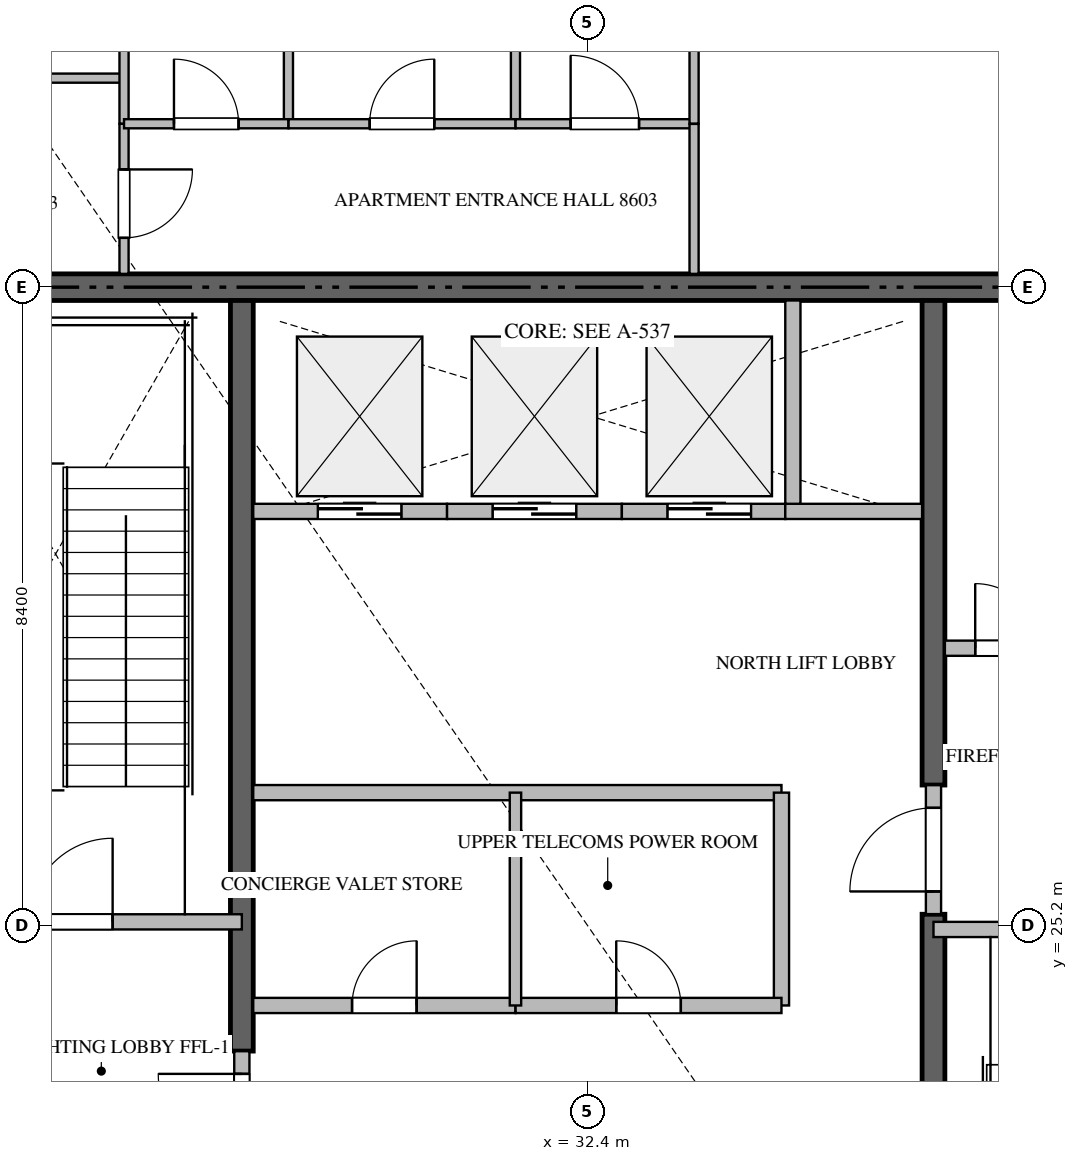
"""IFC4 building model, lengths in metres.
Left out: names, types, materials, properties, quantities, classifications, styles, units other than length and angle.
Written with IfcOpenShell. Run it as: python <this file> out.ifc"""

import sys

from ifc_helpers import new_model, si_unit, direction, frame, frame_2d, origin, place, context, subcontext, project, spatial, rectangle, extrude, source, transform, mapped, element, fill, save


model = new_model("IFC4")
c1 = context("Model", 3, precision=1e-05, world=origin(), true_north=direction((0.0, 1.0)))
c2 = subcontext(c1, "Body", "Model", "MODEL_VIEW")
j1 = project(units=[si_unit("LENGTHUNIT", "METRE"), si_unit("PLANEANGLEUNIT", "RADIAN")], contexts=[c1])
p1 = place(None, origin())
s1 = spatial("IfcSite", under=j1, at=p1, CompositionType="ELEMENT")
p2 = place(p1, origin())
s2 = spatial("IfcBuilding", under=s1, at=p2, CompositionType="ELEMENT")
p3 = place(p2, frame((0.0, 0.0, 347.95)))
s3 = spatial("IfcBuildingStorey", under=s2, at=p3, CompositionType="ELEMENT", Elevation=347.95)
p4 = place(p3, frame((41.4, 33.6, -0.26), z_axis=(0.0, 0.0, 1.0), x_axis=(-1.0, 0.0, 0.0)))
e1 = element("IfcWall", 1, at=p4, inside=s3, PredefinedType="SHEAR", context=c2, shape_type="SweptSolid", body=[
    extrude(rectangle(XDim=18.0, YDim=0.35, at=frame_2d((9.0, 0.0))), origin(), (0.0, 0.0, 1.0), 5.898),
])
p5 = place(p3, frame((27.85, 23.55, -0.26), z_axis=(0.0, 0.0, 1.0), x_axis=(0.0, 1.0, 0.0)))
e2 = element("IfcWall", 2, at=p5, inside=s3, PredefinedType="SHEAR", context=c2, shape_type="SweptSolid", body=[
    extrude(rectangle(XDim=9.875, YDim=0.3, at=frame_2d((4.938, 0.0))), origin(), (0.0, 0.0, 1.0), 5.898),
])
p6 = place(p3, frame((36.95, 16.975, -0.26), z_axis=(0.0, 0.0, 1.0), x_axis=(0.0, 1.0, 0.0)))
e3 = element("IfcWall", 3, at=p6, inside=s3, PredefinedType="SHEAR", context=c2, shape_type="SweptSolid", body=[
    extrude(rectangle(XDim=8.375, YDim=0.3, at=frame_2d((4.188, 0.0))), origin(), (0.0, 0.0, 1.0), 5.898),
])
p7 = place(p3, frame((36.95, 27.05, -0.26), z_axis=(0.0, 0.0, 1.0), x_axis=(0.0, 1.0, 0.0)))
e4 = element("IfcWall", 4, at=p7, inside=s3, PredefinedType="SHEAR", context=c2, shape_type="SweptSolid", body=[
    extrude(rectangle(XDim=6.375, YDim=0.3, at=frame_2d((3.188, 0.0))), origin(), (0.0, 0.0, 1.0), 5.898),
])
p8 = place(p3, frame((23.4, 25.25, 0.0), z_axis=(0.0, 0.0, 1.0), x_axis=(1.0, 0.0, 0.0)))
e5 = element("IfcWall", 5, at=p8, inside=s3, PredefinedType="STANDARD", context=c2, shape_type="SweptSolid", body=[
    extrude(rectangle(XDim=4.45, YDim=0.2, at=frame_2d((2.225, 0.0))), origin(), (0.0, 0.0, 1.0), 5.64),
])
p9 = place(p8, frame((1.65, 0.0, 0.0)))
e6 = element("IfcOpeningElement", 6, at=p9, cuts=e5, PredefinedType="OPENING", context=c2, shape_type="SweptSolid", body=[
    extrude(rectangle(XDim=1.1, YDim=2.15, at=frame_2d((0.55, 1.075))), frame((0.0, 0.11, 0.0), z_axis=(0.0, -1.0, 0.0), x_axis=(1.0, 0.0, 0.0)), (0.0, 0.0, 1.0), 0.22),
])
p10 = place(p3, frame((36.95, 25.15, 0.0), z_axis=(0.0, 0.0, 1.0), x_axis=(1.0, 0.0, 0.0)))
e7 = element("IfcWall", 7, at=p10, inside=s3, PredefinedType="STANDARD", context=c2, shape_type="SweptSolid", body=[
    extrude(rectangle(XDim=4.45, YDim=0.2, at=frame_2d((2.225, 0.0))), origin(), (0.0, 0.0, 1.0), 5.64),
])
p11 = place(p10, frame((1.65, 0.0, 0.0)))
e8 = element("IfcOpeningElement", 8, at=p11, cuts=e7, PredefinedType="OPENING", context=c2, shape_type="SweptSolid", body=[
    extrude(rectangle(XDim=1.1, YDim=2.15, at=frame_2d((0.55, 1.075))), frame((0.0, 0.11, 0.0), z_axis=(0.0, -1.0, 0.0), x_axis=(1.0, 0.0, 0.0)), (0.0, 0.0, 1.0), 0.22),
])
p12 = place(p3, frame((28.0, 30.65, 0.0), z_axis=(0.0, 0.0, 1.0), x_axis=(1.0, 0.0, 0.0)))
e9 = element("IfcWall", 9, at=p12, inside=s3, PredefinedType="STANDARD", context=c2, shape_type="SweptSolid", body=[
    extrude(rectangle(XDim=2.55, YDim=0.2, at=frame_2d((1.275, 0.0))), origin(), (0.0, 0.0, 1.0), 5.64),
])
p13 = place(p12, frame((0.85, 0.0, 0.0)))
e10 = element("IfcOpeningElement", 10, at=p13, cuts=e9, PredefinedType="OPENING", context=c2, shape_type="SweptSolid", body=[
    extrude(rectangle(XDim=1.1, YDim=2.2, at=frame_2d((0.55, 1.1))), frame((0.0, 0.11, 0.0), z_axis=(0.0, -1.0, 0.0), x_axis=(1.0, 0.0, 0.0)), (0.0, 0.0, 1.0), 0.22),
])
p14 = place(p3, frame((30.55, 30.65, 0.0), z_axis=(0.0, 0.0, 1.0), x_axis=(1.0, 0.0, 0.0)))
e11 = element("IfcWall", 11, at=p14, inside=s3, PredefinedType="STANDARD", context=c2, shape_type="SweptSolid", body=[
    extrude(rectangle(XDim=2.3, YDim=0.2, at=frame_2d((1.15, 0.0))), origin(), (0.0, 0.0, 1.0), 5.64),
])
p15 = place(p14, frame((0.6, 0.0, 0.0)))
e12 = element("IfcOpeningElement", 12, at=p15, cuts=e11, PredefinedType="OPENING", context=c2, shape_type="SweptSolid", body=[
    extrude(rectangle(XDim=1.1, YDim=2.2, at=frame_2d((0.55, 1.1))), frame((0.0, 0.11, 0.0), z_axis=(0.0, -1.0, 0.0), x_axis=(1.0, 0.0, 0.0)), (0.0, 0.0, 1.0), 0.22),
])
p16 = place(p3, frame((32.85, 30.65, 0.0), z_axis=(0.0, 0.0, 1.0), x_axis=(1.0, 0.0, 0.0)))
e13 = element("IfcWall", 13, at=p16, inside=s3, PredefinedType="STANDARD", context=c2, shape_type="SweptSolid", body=[
    extrude(rectangle(XDim=2.15, YDim=0.2, at=frame_2d((1.075, 0.0))), origin(), (0.0, 0.0, 1.0), 5.64),
])
p17 = place(p16, frame((0.6, 0.0, 0.0)))
e14 = element("IfcOpeningElement", 14, at=p17, cuts=e13, PredefinedType="OPENING", context=c2, shape_type="SweptSolid", body=[
    extrude(rectangle(XDim=1.1, YDim=2.2, at=frame_2d((0.55, 1.1))), frame((0.0, 0.11, 0.0), z_axis=(0.0, -1.0, 0.0), x_axis=(1.0, 0.0, 0.0)), (0.0, 0.0, 1.0), 0.22),
])
p18 = place(p3, frame((35.0, 30.65, 0.0), z_axis=(0.0, 0.0, 1.0), x_axis=(1.0, 0.0, 0.0)))
e15 = element("IfcWall", 15, at=p18, inside=s3, PredefinedType="STANDARD", context=c2, shape_type="SweptSolid", body=[
    extrude(rectangle(XDim=1.8, YDim=0.2, at=frame_2d((0.9, 0.0))), origin(), (0.0, 0.0, 1.0), 5.64),
])
p19 = place(p3, frame((35.1, 30.75, 0.0), z_axis=(0.0, 0.0, 1.0), x_axis=(0.0, 1.0, 0.0)))
e16 = element("IfcWall", 16, at=p19, inside=s3, PredefinedType="STANDARD", context=c2, shape_type="SweptSolid", body=[
    extrude(rectangle(XDim=2.675, YDim=0.2, at=frame_2d((1.337, 0.0))), origin(), (0.0, 0.0, 1.0), 5.64),
])
p20 = place(p3, frame((37.1, 28.85, 0.0), z_axis=(0.0, 0.0, 1.0), x_axis=(1.0, 0.0, 0.0)))
e17 = element("IfcWall", 17, at=p20, inside=s3, PredefinedType="STANDARD", context=c2, shape_type="SweptSolid", body=[
    extrude(rectangle(XDim=1.648, YDim=0.2, at=frame_2d((0.824, 0.0))), origin(), (0.0, 0.0, 1.0), 5.64),
])
p21 = place(p20, frame((0.399, 0.0, 0.0)))
e18 = element("IfcOpeningElement", 18, at=p21, cuts=e17, PredefinedType="OPENING", context=c2, shape_type="SweptSolid", body=[
    extrude(rectangle(XDim=0.85, YDim=2.1, at=frame_2d((0.425, 1.05))), frame((0.0, 0.11, 0.0), z_axis=(0.0, -1.0, 0.0), x_axis=(1.0, 0.0, 0.0)), (0.0, 0.0, 1.0), 0.22),
])
p22 = place(p3, frame((27.85, 21.852, 0.0), z_axis=(0.0, 0.0, 1.0), x_axis=(0.0, 1.0, 0.0)))
e19 = element("IfcWall", 19, at=p22, inside=s3, PredefinedType="STANDARD", context=c2, shape_type="SweptSolid", body=[
    extrude(rectangle(XDim=1.696, YDim=0.2, at=frame_2d((0.848, 0.0))), origin(), (0.0, 0.0, 1.0), 5.64),
])
p23 = place(p22, frame((0.298, 0.0, 0.0)))
e20 = element("IfcOpeningElement", 20, at=p23, cuts=e19, PredefinedType="OPENING", context=c2, shape_type="SweptSolid", body=[
    extrude(rectangle(XDim=1.1, YDim=2.15, at=frame_2d((0.55, 1.075))), frame((0.0, 0.11, 0.0), z_axis=(0.0, -1.0, 0.0), x_axis=(1.0, 0.0, 0.0)), (0.0, 0.0, 1.0), 0.22),
])
p24 = place(p3, frame((36.95, 25.352, 0.0), z_axis=(0.0, 0.0, 1.0), x_axis=(0.0, 1.0, 0.0)))
e21 = element("IfcWall", 21, at=p24, inside=s3, PredefinedType="STANDARD", context=c2, shape_type="SweptSolid", body=[
    extrude(rectangle(XDim=1.696, YDim=0.2, at=frame_2d((0.848, 0.0))), origin(), (0.0, 0.0, 1.0), 5.64),
])
p25 = place(p24, frame((0.298, 0.0, 0.0)))
e22 = element("IfcOpeningElement", 22, at=p25, cuts=e21, PredefinedType="OPENING", context=c2, shape_type="SweptSolid", body=[
    extrude(rectangle(XDim=1.1, YDim=2.15, at=frame_2d((0.55, 1.075))), frame((0.0, 0.11, 0.0), z_axis=(0.0, -1.0, 0.0), x_axis=(1.0, 0.0, 0.0)), (0.0, 0.0, 1.0), 0.22),
])
p26 = place(p3, frame((28.0, 26.95, 0.0), z_axis=(0.0, 0.0, 1.0), x_axis=(1.0, 0.0, 0.0)))
e23 = element("IfcWall", 23, at=p26, inside=s3, PredefinedType="STANDARD", context=c2, shape_type="SweptSolid", body=[
    extrude(rectangle(XDim=6.95, YDim=0.2, at=frame_2d((3.475, 0.0))), origin(), (0.0, 0.0, 1.0), 5.64),
])
p27 = place(p3, frame((34.95, 24.15, 0.0), z_axis=(0.0, 0.0, 1.0), x_axis=(0.0, 1.0, 0.0)))
e24 = element("IfcWall", 24, at=p27, inside=s3, PredefinedType="STANDARD", context=c2, shape_type="SweptSolid", body=[
    extrude(rectangle(XDim=2.8, YDim=0.2, at=frame_2d((1.4, 0.0))), origin(), (0.0, 0.0, 1.0), 5.64),
])
p28 = place(p3, frame((28.0, 24.15, 0.0), z_axis=(0.0, 0.0, 1.0), x_axis=(1.0, 0.0, 0.0)))
e25 = element("IfcWall", 25, at=p28, inside=s3, PredefinedType="STANDARD", context=c2, shape_type="SweptSolid", body=[
    extrude(rectangle(XDim=3.45, YDim=0.2, at=frame_2d((1.725, 0.0))), origin(), (0.0, 0.0, 1.0), 5.64),
])
p29 = place(p28, frame((1.3, 0.0, 0.0)))
e26 = element("IfcOpeningElement", 26, at=p29, cuts=e25, PredefinedType="OPENING", context=c2, shape_type="SweptSolid", body=[
    extrude(rectangle(XDim=0.85, YDim=2.1, at=frame_2d((0.425, 1.05))), frame((0.0, 0.11, 0.0), z_axis=(0.0, -1.0, 0.0), x_axis=(1.0, 0.0, 0.0)), (0.0, 0.0, 1.0), 0.22),
])
p30 = place(p3, frame((31.452, 24.15, 0.0), z_axis=(0.0, 0.0, 1.0), x_axis=(1.0, 0.0, 0.0)))
e27 = element("IfcWall", 27, at=p30, inside=s3, PredefinedType="STANDARD", context=c2, shape_type="SweptSolid", body=[
    extrude(rectangle(XDim=3.498, YDim=0.2, at=frame_2d((1.749, 0.0))), origin(), (0.0, 0.0, 1.0), 5.64),
])
p31 = place(p30, frame((1.324, 0.0, 0.0)))
e28 = element("IfcOpeningElement", 28, at=p31, cuts=e27, PredefinedType="OPENING", context=c2, shape_type="SweptSolid", body=[
    extrude(rectangle(XDim=0.85, YDim=2.1, at=frame_2d((0.425, 1.05))), frame((0.0, 0.11, 0.0), z_axis=(0.0, -1.0, 0.0), x_axis=(1.0, 0.0, 0.0)), (0.0, 0.0, 1.0), 0.22),
])
p32 = place(p3, frame((31.45, 24.15, 0.0), z_axis=(0.0, 0.0, 1.0), x_axis=(0.0, 1.0, 0.0)))
e29 = element("IfcWall", 29, at=p32, inside=s3, PredefinedType="PARTITIONING", context=c2, shape_type="SweptSolid", body=[
    extrude(rectangle(XDim=2.8, YDim=0.15, at=frame_2d((1.4, 0.0))), origin(), (0.0, 0.0, 1.0), 5.64),
])
p33 = place(p3, frame((23.45, 36.35, 0.0), z_axis=(0.0, 0.0, 1.0), x_axis=(1.0, 0.0, 0.0)))
e30 = element("IfcWall", 30, at=p33, inside=s3, PredefinedType="PARTITIONING", context=c2, shape_type="SweptSolid", body=[
    extrude(rectangle(XDim=2.85, YDim=0.12, at=frame_2d((1.425, 0.0))), origin(), (0.0, 0.0, 1.0), 5.64),
])
p34 = place(p33, frame((1.0, 0.0, 0.0)))
e31 = element("IfcOpeningElement", 31, at=p34, cuts=e30, PredefinedType="OPENING", context=c2, shape_type="SweptSolid", body=[
    extrude(rectangle(XDim=0.85, YDim=2.1, at=frame_2d((0.425, 1.05))), frame((0.0, 0.07, 0.0), z_axis=(0.0, -1.0, 0.0), x_axis=(1.0, 0.0, 0.0)), (0.0, 0.0, 1.0), 0.14),
])
p35 = place(p3, frame((26.3, 35.75, 0.0), z_axis=(0.0, 0.0, 1.0), x_axis=(0.0, -1.0, 0.0)))
e32 = element("IfcWall", 32, at=p35, inside=s3, PredefinedType="PARTITIONING", context=c2, shape_type="SweptSolid", body=[
    extrude(rectangle(XDim=1.975, YDim=0.12, at=frame_2d((0.988, 0.0))), origin(), (0.0, 0.0, 1.0), 5.64),
])
p36 = place(p35, frame((0.601, 0.0, 0.0)))
e33 = element("IfcOpeningElement", 33, at=p36, cuts=e32, PredefinedType="OPENING", context=c2, shape_type="SweptSolid", body=[
    extrude(rectangle(XDim=0.9, YDim=2.1, at=frame_2d((0.45, 1.05))), frame((0.0, 0.07, 0.0), z_axis=(0.0, -1.0, 0.0), x_axis=(1.0, 0.0, 0.0)), (0.0, 0.0, 1.0), 0.14),
])
p37 = place(p3, frame((26.3, 40.027, 0.0), z_axis=(0.0, 0.0, 1.0), x_axis=(0.0, -1.0, 0.0)))
e34 = element("IfcWall", 34, at=p37, inside=s3, PredefinedType="PARTITIONING", context=c2, shape_type="SweptSolid", body=[
    extrude(rectangle(XDim=4.275, YDim=0.12, at=frame_2d((2.138, 0.0))), origin(), (0.0, 0.0, 1.0), 5.64),
])
p38 = place(p3, frame((31.45, 46.305, 0.0), z_axis=(0.0, 0.0, 1.0), x_axis=(0.0, -1.0, 0.0)))
e35 = element("IfcWall", 35, at=p38, inside=s3, PredefinedType="PARTITIONING", context=c2, shape_type="SweptSolid", body=[
    extrude(rectangle(XDim=10.555, YDim=0.12, at=frame_2d((5.277, 0.0))), origin(), (0.0, 0.0, 1.0), 5.64),
])
p39 = place(p3, frame((28.463, 40.029, 0.0), z_axis=(0.0, 0.0, 1.0), x_axis=(0.0, -1.0, 0.0)))
e36 = element("IfcWall", 36, at=p39, inside=s3, PredefinedType="PARTITIONING", context=c2, shape_type="SweptSolid", body=[
    extrude(rectangle(XDim=4.279, YDim=0.12, at=frame_2d((2.14, 0.0))), origin(), (0.0, 0.0, 1.0), 5.64),
])
p40 = place(p3, frame((26.3, 35.75, 0.0), z_axis=(0.0, 0.0, 1.0), x_axis=(1.0, 0.0, 0.0)))
e37 = element("IfcWall", 37, at=p40, inside=s3, PredefinedType="PARTITIONING", context=c2, shape_type="SweptSolid", body=[
    extrude(rectangle(XDim=2.163, YDim=0.12, at=frame_2d((1.082, 0.0))), origin(), (0.0, 0.0, 1.0), 5.64),
])
p41 = place(p40, frame((0.657, 0.0, 0.0)))
e38 = element("IfcOpeningElement", 38, at=p41, cuts=e37, PredefinedType="OPENING", context=c2, shape_type="SweptSolid", body=[
    extrude(rectangle(XDim=0.85, YDim=2.1, at=frame_2d((0.425, 1.05))), frame((0.0, 0.07, 0.0), z_axis=(0.0, -1.0, 0.0), x_axis=(1.0, 0.0, 0.0)), (0.0, 0.0, 1.0), 0.14),
])
p42 = place(p3, frame((28.465, 35.75, 0.0), z_axis=(0.0, 0.0, 1.0), x_axis=(1.0, 0.0, 0.0)))
e39 = element("IfcWall", 39, at=p42, inside=s3, PredefinedType="PARTITIONING", context=c2, shape_type="SweptSolid", body=[
    extrude(rectangle(XDim=2.985, YDim=0.12, at=frame_2d((1.492, 0.0))), origin(), (0.0, 0.0, 1.0), 5.64),
])
p43 = place(p42, frame((1.067, 0.0, 0.0)))
e40 = element("IfcOpeningElement", 40, at=p43, cuts=e39, PredefinedType="OPENING", context=c2, shape_type="SweptSolid", body=[
    extrude(rectangle(XDim=0.85, YDim=2.1, at=frame_2d((0.425, 1.05))), frame((0.0, 0.07, 0.0), z_axis=(0.0, -1.0, 0.0), x_axis=(1.0, 0.0, 0.0)), (0.0, 0.0, 1.0), 0.14),
])
p44 = place(p3, frame((31.452, 35.75, 0.0), z_axis=(0.0, 0.0, 1.0), x_axis=(1.0, 0.0, 0.0)))
e41 = element("IfcWall", 41, at=p44, inside=s3, PredefinedType="PARTITIONING", context=c2, shape_type="SweptSolid", body=[
    extrude(rectangle(XDim=2.348, YDim=0.12, at=frame_2d((1.174, 0.0))), origin(), (0.0, 0.0, 1.0), 5.64),
])
p45 = place(p44, frame((0.724, 0.0, 0.0)))
e42 = element("IfcOpeningElement", 42, at=p45, cuts=e41, PredefinedType="OPENING", context=c2, shape_type="SweptSolid", body=[
    extrude(rectangle(XDim=0.9, YDim=2.1, at=frame_2d((0.45, 1.05))), frame((0.0, 0.07, 0.0), z_axis=(0.0, -1.0, 0.0), x_axis=(1.0, 0.0, 0.0)), (0.0, 0.0, 1.0), 0.14),
])
p46 = place(p3, frame((33.8, 39.009, 0.0), z_axis=(0.0, 0.0, 1.0), x_axis=(0.0, -1.0, 0.0)))
e43 = element("IfcWall", 43, at=p46, inside=s3, PredefinedType="PARTITIONING", context=c2, shape_type="SweptSolid", body=[
    extrude(rectangle(XDim=3.259, YDim=0.12, at=frame_2d((1.629, 0.0))), origin(), (0.0, 0.0, 1.0), 5.64),
])
p47 = place(p46, frame((1.205, 0.0, 0.0)))
e44 = element("IfcOpeningElement", 44, at=p47, cuts=e43, PredefinedType="OPENING", context=c2, shape_type="SweptSolid", body=[
    extrude(rectangle(XDim=0.85, YDim=2.1, at=frame_2d((0.425, 1.05))), frame((0.0, 0.07, 0.0), z_axis=(0.0, -1.0, 0.0), x_axis=(1.0, 0.0, 0.0)), (0.0, 0.0, 1.0), 0.14),
])
p48 = place(p3, frame((33.8, 35.748, 0.0), z_axis=(0.0, 0.0, 1.0), x_axis=(0.0, -1.0, 0.0)))
e45 = element("IfcWall", 45, at=p48, inside=s3, PredefinedType="PARTITIONING", context=c2, shape_type="SweptSolid", body=[
    extrude(rectangle(XDim=1.973, YDim=0.12, at=frame_2d((0.987, 0.0))), origin(), (0.0, 0.0, 1.0), 5.64),
])
m1 = source(origin(), c2, "Body", "SweptSolid", [
    extrude(rectangle(XDim=1.1, YDim=2.15, at=frame_2d((0.55, 1.075))), frame((0.0, 0.025, 0.0), z_axis=(0.0, -1.0, 0.0), x_axis=(1.0, 0.0, 0.0)), (0.0, 0.0, 1.0), 0.05),
])
p49 = place(p9, origin())
e46 = element("IfcDoor", 46, at=p49, inside=s3, OperationType="SINGLE_SWING_RIGHT", PredefinedType="DOOR", context=c2, shape_type="MappedRepresentation", body=[
    mapped(m1, transform((0.0, 0.0, 0.0), scale=1.0)),
])
fill(e6, e46)
m2 = source(origin(), c2, "Body", "SweptSolid", [
    extrude(rectangle(XDim=1.1, YDim=2.2, at=frame_2d((0.55, 1.1))), frame((0.0, 0.025, 0.0), z_axis=(0.0, -1.0, 0.0), x_axis=(1.0, 0.0, 0.0)), (0.0, 0.0, 1.0), 0.05),
])
p50 = place(p13, origin())
e47 = element("IfcDoor", 47, at=p50, inside=s3, OperationType="DOUBLE_DOOR_SLIDING", PredefinedType="DOOR", context=c2, shape_type="MappedRepresentation", body=[
    mapped(m2, transform((0.0, 0.0, 0.0), scale=1.0)),
])
fill(e10, e47)
p51 = place(p15, origin())
e48 = element("IfcDoor", 48, at=p51, inside=s3, OperationType="DOUBLE_DOOR_SLIDING", PredefinedType="DOOR", context=c2, shape_type="MappedRepresentation", body=[
    mapped(m2, transform((0.0, 0.0, 0.0), scale=1.0)),
])
fill(e12, e48)
p52 = place(p17, origin())
e49 = element("IfcDoor", 49, at=p52, inside=s3, OperationType="DOUBLE_DOOR_SLIDING", PredefinedType="DOOR", context=c2, shape_type="MappedRepresentation", body=[
    mapped(m2, transform((0.0, 0.0, 0.0), scale=1.0)),
])
fill(e14, e49)
m3 = source(origin(), c2, "Body", "SweptSolid", [
    extrude(rectangle(XDim=0.85, YDim=2.1, at=frame_2d((0.425, 1.05))), frame((0.0, 0.025, 0.0), z_axis=(0.0, -1.0, 0.0), x_axis=(1.0, 0.0, 0.0)), (0.0, 0.0, 1.0), 0.05),
])
p53 = place(p21, origin())
e50 = element("IfcDoor", 50, at=p53, inside=s3, OperationType="SINGLE_SWING_LEFT", PredefinedType="DOOR", context=c2, shape_type="MappedRepresentation", body=[
    mapped(m3, transform((0.0, 0.0, 0.0), scale=1.0)),
])
fill(e18, e50)
p54 = place(p23, origin())
e51 = element("IfcDoor", 51, at=p54, inside=s3, OperationType="SINGLE_SWING_RIGHT", PredefinedType="DOOR", context=c2, shape_type="MappedRepresentation", body=[
    mapped(m1, transform((0.0, 0.0, 0.0), scale=1.0)),
])
fill(e20, e51)
p55 = place(p25, origin())
e52 = element("IfcDoor", 52, at=p55, inside=s3, OperationType="SINGLE_SWING_LEFT", PredefinedType="DOOR", context=c2, shape_type="MappedRepresentation", body=[
    mapped(m1, transform((0.0, 0.0, 0.0), scale=1.0)),
])
fill(e22, e52)
p56 = place(p29, origin())
e53 = element("IfcDoor", 53, at=p56, inside=s3, OperationType="SINGLE_SWING_RIGHT", PredefinedType="DOOR", context=c2, shape_type="MappedRepresentation", body=[
    mapped(m3, transform((0.0, 0.0, 0.0), scale=1.0)),
])
fill(e26, e53)
p57 = place(p31, origin())
e54 = element("IfcDoor", 54, at=p57, inside=s3, OperationType="SINGLE_SWING_LEFT", PredefinedType="DOOR", context=c2, shape_type="MappedRepresentation", body=[
    mapped(m3, transform((0.0, 0.0, 0.0), scale=1.0)),
])
fill(e28, e54)
m4 = source(origin(), c2, "Body", "SweptSolid", [
    extrude(rectangle(XDim=0.9, YDim=2.1, at=frame_2d((0.45, 1.05))), frame((0.0, 0.025, 0.0), z_axis=(0.0, -1.0, 0.0), x_axis=(1.0, 0.0, 0.0)), (0.0, 0.0, 1.0), 0.05),
])
p58 = place(p36, origin())
e55 = element("IfcDoor", 55, at=p58, inside=s3, OperationType="SINGLE_SWING_LEFT", PredefinedType="DOOR", context=c2, shape_type="MappedRepresentation", body=[
    mapped(m4, transform((0.0, 0.0, 0.0), scale=1.0)),
])
fill(e33, e55)
p59 = place(p41, origin())
e56 = element("IfcDoor", 56, at=p59, inside=s3, OperationType="SINGLE_SWING_LEFT", PredefinedType="DOOR", context=c2, shape_type="MappedRepresentation", body=[
    mapped(m3, transform((0.0, 0.0, 0.0), scale=1.0)),
])
fill(e38, e56)
p60 = place(p43, origin())
e57 = element("IfcDoor", 57, at=p60, inside=s3, OperationType="SINGLE_SWING_RIGHT", PredefinedType="DOOR", context=c2, shape_type="MappedRepresentation", body=[
    mapped(m3, transform((0.0, 0.0, 0.0), scale=1.0)),
])
fill(e40, e57)
p61 = place(p45, origin())
e58 = element("IfcDoor", 58, at=p61, inside=s3, OperationType="SINGLE_SWING_LEFT", PredefinedType="DOOR", context=c2, shape_type="MappedRepresentation", body=[
    mapped(m4, transform((0.0, 0.0, 0.0), scale=1.0)),
])
fill(e42, e58)
save(model, sys.argv[1])
